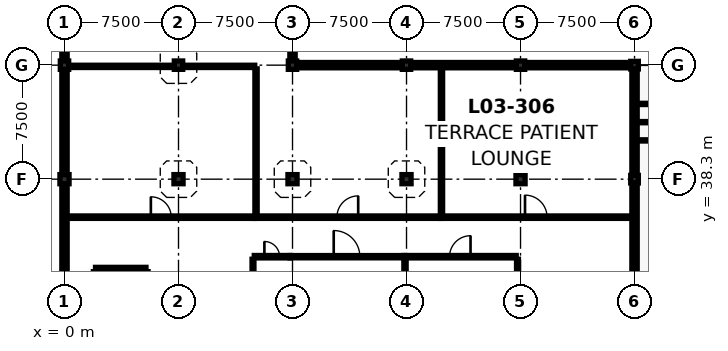
"""IFC4 building model, lengths in metres.
Left out: names, types, materials, properties, quantities, classifications, styles, units other than length and angle.
Written with IfcOpenShell. Run it as: python <this file> out.ifc"""

import sys

from ifc_helpers import new_model, si_unit, direction, frame, frame_2d, origin, origin_2d, place, context, subcontext, project, spatial, rectangle, extrude, element, fill, save


model = new_model("IFC4")
c1 = context("Model", 3, precision=1e-05, world=origin(), true_north=direction((0.0, 1.0)))
c2 = subcontext(c1, "Body", "Model", "MODEL_VIEW")
j1 = project(units=[si_unit("LENGTHUNIT", "METRE"), si_unit("PLANEANGLEUNIT", "RADIAN")], contexts=[c1])
p1 = place(None, origin())
s1 = spatial("IfcSite", under=j1, at=p1, CompositionType="ELEMENT")
p2 = place(p1, origin())
s2 = spatial("IfcBuilding", under=s1, at=p2, CompositionType="ELEMENT")
p3 = place(p2, frame((0.0, 0.0, 13.5)))
s3 = spatial("IfcBuildingStorey", under=s2, at=p3, CompositionType="ELEMENT", Elevation=13.5)
p4 = place(p3, frame((0.0, 38.3, 0.0), z_axis=(0.0, 0.0, 1.0), x_axis=(1.0, 0.0, 0.0)))
e1 = element("IfcColumn", 1, at=p4, inside=s3, PredefinedType="COLUMN", context=c2, shape_type="SweptSolid", body=[
    extrude(rectangle(XDim=0.6, YDim=0.6, at=origin_2d()), origin(), (0.0, 0.0, 1.0), 3.72),
])
p5 = place(p3, frame((0.0, 45.8, 0.0), z_axis=(0.0, 0.0, 1.0), x_axis=(1.0, 0.0, 0.0)))
e2 = element("IfcColumn", 2, at=p5, inside=s3, PredefinedType="COLUMN", context=c2, shape_type="SweptSolid", body=[
    extrude(rectangle(XDim=0.55, YDim=0.55, at=origin_2d()), origin(), (0.0, 0.0, 1.0), 3.72),
])
p6 = place(p3, frame((7.5, 38.3, 0.0), z_axis=(0.0, 0.0, 1.0), x_axis=(1.0, 0.0, 0.0)))
e3 = element("IfcColumn", 3, at=p6, inside=s3, PredefinedType="COLUMN", context=c2, shape_type="SweptSolid", body=[
    extrude(rectangle(XDim=0.6, YDim=0.6, at=origin_2d()), origin(), (0.0, 0.0, 1.0), 3.72),
])
p7 = place(p3, frame((7.5, 45.8, 0.0), z_axis=(0.0, 0.0, 1.0), x_axis=(1.0, 0.0, 0.0)))
e4 = element("IfcColumn", 4, at=p7, inside=s3, PredefinedType="COLUMN", context=c2, shape_type="SweptSolid", body=[
    extrude(rectangle(XDim=0.55, YDim=0.55, at=origin_2d()), origin(), (0.0, 0.0, 1.0), 3.72),
])
p8 = place(p3, frame((15.0, 38.3, 0.0), z_axis=(0.0, 0.0, 1.0), x_axis=(1.0, 0.0, 0.0)))
e5 = element("IfcColumn", 5, at=p8, inside=s3, PredefinedType="COLUMN", context=c2, shape_type="SweptSolid", body=[
    extrude(rectangle(XDim=0.6, YDim=0.6, at=origin_2d()), origin(), (0.0, 0.0, 1.0), 3.72),
])
p9 = place(p3, frame((15.0, 45.8, 0.0), z_axis=(0.0, 0.0, 1.0), x_axis=(1.0, 0.0, 0.0)))
e6 = element("IfcColumn", 6, at=p9, inside=s3, PredefinedType="COLUMN", context=c2, shape_type="SweptSolid", body=[
    extrude(rectangle(XDim=0.55, YDim=0.55, at=origin_2d()), origin(), (0.0, 0.0, 1.0), 3.72),
])
p10 = place(p3, frame((22.5, 38.3, 0.0), z_axis=(0.0, 0.0, 1.0), x_axis=(1.0, 0.0, 0.0)))
e7 = element("IfcColumn", 7, at=p10, inside=s3, PredefinedType="COLUMN", context=c2, shape_type="SweptSolid", body=[
    extrude(rectangle(XDim=0.6, YDim=0.6, at=origin_2d()), origin(), (0.0, 0.0, 1.0), 3.72),
])
p11 = place(p3, frame((22.5, 45.8, 0.0), z_axis=(0.0, 0.0, 1.0), x_axis=(1.0, 0.0, 0.0)))
e8 = element("IfcColumn", 8, at=p11, inside=s3, PredefinedType="COLUMN", context=c2, shape_type="SweptSolid", body=[
    extrude(rectangle(XDim=0.55, YDim=0.55, at=origin_2d()), origin(), (0.0, 0.0, 1.0), 3.72),
])
p12 = place(p3, frame((30.0, 38.3, 0.0), z_axis=(0.0, 0.0, 1.0), x_axis=(1.0, 0.0, 0.0)))
e9 = element("IfcColumn", 9, at=p12, inside=s3, PredefinedType="COLUMN", context=c2, shape_type="SweptSolid", body=[
    extrude(rectangle(XDim=0.6, YDim=0.6, at=origin_2d()), origin(), (0.0, 0.0, 1.0), 3.72),
])
p13 = place(p3, frame((30.0, 45.8, 0.0), z_axis=(0.0, 0.0, 1.0), x_axis=(1.0, 0.0, 0.0)))
e10 = element("IfcColumn", 10, at=p13, inside=s3, PredefinedType="COLUMN", context=c2, shape_type="SweptSolid", body=[
    extrude(rectangle(XDim=0.55, YDim=0.55, at=origin_2d()), origin(), (0.0, 0.0, 1.0), 3.72),
])
for number, where, z_axis, x_axis in (
    (11, (37.5, 38.3, 0.0), (0.0, 0.0, 1.0), (1.0, 0.0, 0.0)),
    (12, (37.5, 45.8, 0.0), (0.0, 0.0, 1.0), (1.0, 0.0, 0.0)),
):
    element("IfcColumn", number, at=place(p3, frame(where, z_axis=z_axis, x_axis=x_axis)), inside=s3, PredefinedType="COLUMN", context=c2, shape_type="SweptSolid", body=[
        extrude(rectangle(XDim=0.5, YDim=0.5, at=origin_2d()), origin(), (0.0, 0.0, 1.0), 3.72),
    ])
for number, where, z_axis, x_axis in (
    (13, (15.275, 45.8, 0.0), (0.0, 0.0, 1.0), (1.0, 0.0, 0.0)),
    (14, (22.775, 45.8, 0.0), (0.0, 0.0, 1.0), (1.0, 0.0, 0.0)),
):
    element("IfcWall", number, at=place(p3, frame(where, z_axis=z_axis, x_axis=x_axis)), inside=s3, PredefinedType="SOLIDWALL", context=c2, shape_type="SweptSolid", body=[
        extrude(rectangle(XDim=6.95, YDim=0.35, at=frame_2d((3.475, 0.0))), origin(), (0.0, 0.0, 1.0), 2.805),
    ])
p14 = place(p3, frame((30.275, 45.8, 0.0), z_axis=(0.0, 0.0, 1.0), x_axis=(1.0, 0.0, 0.0)))
e15 = element("IfcWall", 15, at=p14, inside=s3, PredefinedType="SOLIDWALL", context=c2, shape_type="SweptSolid", body=[
    extrude(rectangle(XDim=6.975, YDim=0.35, at=frame_2d((3.488, 0.0))), origin(), (0.0, 0.0, 1.0), 3.055),
])
p15 = place(p3, frame((37.5, 45.55, 0.0), z_axis=(0.0, 0.0, 1.0), x_axis=(0.0, -1.0, 0.0)))
e16 = element("IfcWall", 16, at=p15, inside=s3, PredefinedType="SOLIDWALL", context=c2, shape_type="SweptSolid", body=[
    extrude(rectangle(XDim=7.0, YDim=0.35, at=frame_2d((3.5, 0.0))), origin(), (0.0, 0.0, 1.0), 3.7),
])
p16 = place(p15, frame((2.8, 0.0, 0.9)))
e17 = element("IfcOpeningElement", 17, at=p16, cuts=e16, PredefinedType="OPENING", context=c2, shape_type="SweptSolid", body=[
    extrude(rectangle(XDim=1.4, YDim=1.9, at=frame_2d((0.7, 0.95))), frame((0.0, 0.187, 0.0), z_axis=(0.0, -1.0, 0.0), x_axis=(1.0, 0.0, 0.0)), (0.0, 0.0, 1.0), 0.374),
])
p17 = place(p3, frame((37.5, 38.05, 0.0), z_axis=(0.0, 0.0, 1.0), x_axis=(0.0, -1.0, 0.0)))
e18 = element("IfcWall", 18, at=p17, inside=s3, PredefinedType="SOLIDWALL", context=c2, shape_type="SweptSolid", body=[
    extrude(rectangle(XDim=7.0, YDim=0.35, at=frame_2d((3.5, 0.0))), origin(), (0.0, 0.0, 1.0), 3.7),
])
p18 = place(p3, frame((0.0, 31.1, 0.0), z_axis=(0.0, 0.0, 1.0), x_axis=(0.0, 1.0, 0.0)))
e19 = element("IfcWall", 19, at=p18, inside=s3, PredefinedType="SOLIDWALL", context=c2, shape_type="SweptSolid", body=[
    extrude(rectangle(XDim=6.9, YDim=0.35, at=frame_2d((3.45, 0.0))), origin(), (0.0, 0.0, 1.0), 2.805),
])
p19 = place(p3, frame((0.0, 38.6, 0.0), z_axis=(0.0, 0.0, 1.0), x_axis=(0.0, 1.0, 0.0)))
e20 = element("IfcWall", 20, at=p19, inside=s3, PredefinedType="SOLIDWALL", context=c2, shape_type="SweptSolid", body=[
    extrude(rectangle(XDim=6.925, YDim=0.35, at=frame_2d((3.462, 0.0))), origin(), (0.0, 0.0, 1.0), 2.805),
])
p20 = place(p3, frame((0.0, 46.075, 0.0), z_axis=(0.0, 0.0, 1.0), x_axis=(0.0, 1.0, 0.0)))
e21 = element("IfcWall", 21, at=p20, inside=s3, PredefinedType="SOLIDWALL", context=c2, shape_type="SweptSolid", body=[
    extrude(rectangle(XDim=6.975, YDim=0.35, at=frame_2d((3.488, 0.0))), origin(), (0.0, 0.0, 1.0), 3.055),
])
p21 = place(p3, frame((15.0, 53.05, 0.0), z_axis=(0.0, 0.0, 1.0), x_axis=(0.0, -1.0, 0.0)))
e22 = element("IfcWall", 22, at=p21, inside=s3, PredefinedType="SOLIDWALL", context=c2, shape_type="SweptSolid", body=[
    extrude(rectangle(XDim=6.975, YDim=0.35, at=frame_2d((3.488, 0.0))), origin(), (0.0, 0.0, 1.0), 3.055),
])
p22 = place(p21, frame((2.587, 0.0, 0.9)))
e23 = element("IfcOpeningElement", 23, at=p22, cuts=e22, PredefinedType="OPENING", context=c2, shape_type="SweptSolid", body=[
    extrude(rectangle(XDim=1.8, YDim=1.5, at=frame_2d((0.9, 0.75))), frame((0.0, 0.187, 0.0), z_axis=(0.0, -1.0, 0.0), x_axis=(1.0, 0.0, 0.0)), (0.0, 0.0, 1.0), 0.374),
])
p23 = place(p3, frame((5.36, 24.985, 0.0), z_axis=(0.0, 0.0, 1.0), x_axis=(0.0, 1.0, 0.0)))
e24 = element("IfcWall", 24, at=p23, inside=s3, PredefinedType="SHEAR", context=c2, shape_type="SweptSolid", body=[
    extrude(rectangle(XDim=7.23, YDim=0.28, at=frame_2d((3.615, 0.0))), origin(), (0.0, 0.0, 1.0), 3.72),
])
p24 = place(p3, frame((5.36, 32.36, 0.0), z_axis=(0.0, 0.0, 1.0), x_axis=(-1.0, 0.0, 0.0)))
e25 = element("IfcWall", 25, at=p24, inside=s3, PredefinedType="SHEAR", context=c2, shape_type="SweptSolid", body=[
    extrude(rectangle(XDim=3.32, YDim=0.28, at=frame_2d((1.66, 0.0))), origin(), (0.0, 0.0, 1.0), 3.72),
])
p25 = place(p3, frame((2.04, 32.215, 0.0), z_axis=(0.0, 0.0, 1.0), x_axis=(0.0, -1.0, 0.0)))
e26 = element("IfcWall", 26, at=p25, inside=s3, PredefinedType="SHEAR", context=c2, shape_type="SweptSolid", body=[
    extrude(rectangle(XDim=7.23, YDim=0.28, at=frame_2d((3.615, 0.0))), origin(), (0.0, 0.0, 1.0), 3.72),
])
p26 = place(p3, frame((0.187, 35.8, 0.0), z_axis=(0.0, 0.0, 1.0), x_axis=(1.0, 0.0, 0.0)))
e27 = element("IfcWall", 27, at=p26, inside=s3, PredefinedType="PARTITIONING", context=c2, shape_type="SweptSolid", body=[
    extrude(rectangle(XDim=12.328, YDim=0.16, at=frame_2d((6.164, 0.0))), origin(), (0.0, 0.0, 1.0), 2.805),
])
p27 = place(p26, frame((5.494, 0.0, 0.0)))
e28 = element("IfcOpeningElement", 28, at=p27, cuts=e27, PredefinedType="OPENING", context=c2, shape_type="SweptSolid", body=[
    extrude(rectangle(XDim=1.34, YDim=2.24, at=frame_2d((0.67, 1.12))), frame((0.0, 0.092, 0.0), z_axis=(0.0, -1.0, 0.0), x_axis=(1.0, 0.0, 0.0)), (0.0, 0.0, 1.0), 0.184),
])
p28 = place(p3, frame((12.527, 35.8, 0.0), z_axis=(0.0, 0.0, 1.0), x_axis=(1.0, 0.0, 0.0)))
e29 = element("IfcWall", 29, at=p28, inside=s3, PredefinedType="PARTITIONING", context=c2, shape_type="SweptSolid", body=[
    extrude(rectangle(XDim=12.188, YDim=0.16, at=frame_2d((6.094, 0.0))), origin(), (0.0, 0.0, 1.0), 2.805),
])
p29 = place(p28, frame((5.394, 0.0, 0.0)))
e30 = element("IfcOpeningElement", 30, at=p29, cuts=e29, PredefinedType="OPENING", context=c2, shape_type="SweptSolid", body=[
    extrude(rectangle(XDim=1.4, YDim=2.25, at=frame_2d((0.7, 1.125))), frame((0.0, 0.092, 0.0), z_axis=(0.0, -1.0, 0.0), x_axis=(1.0, 0.0, 0.0)), (0.0, 0.0, 1.0), 0.184),
])
p30 = place(p3, frame((24.727, 35.8, 0.0), z_axis=(0.0, 0.0, 1.0), x_axis=(1.0, 0.0, 0.0)))
e31 = element("IfcWall", 31, at=p30, inside=s3, PredefinedType="PARTITIONING", context=c2, shape_type="SweptSolid", body=[
    extrude(rectangle(XDim=12.586, YDim=0.16, at=frame_2d((6.293, 0.0))), origin(), (0.0, 0.0, 1.0), 3.055),
])
p31 = place(p30, frame((5.568, 0.0, 0.0)))
e32 = element("IfcOpeningElement", 32, at=p31, cuts=e31, PredefinedType="OPENING", context=c2, shape_type="SweptSolid", body=[
    extrude(rectangle(XDim=1.45, YDim=2.26, at=frame_2d((0.725, 1.13))), frame((0.0, 0.092, 0.0), z_axis=(0.0, -1.0, 0.0), x_axis=(1.0, 0.0, 0.0)), (0.0, 0.0, 1.0), 0.184),
])
p32 = place(p3, frame((12.485, 33.2, 0.0), z_axis=(0.0, 0.0, 1.0), x_axis=(1.0, 0.0, 0.0)))
e33 = element("IfcWall", 33, at=p32, inside=s3, PredefinedType="PARTITIONING", context=c2, shape_type="SweptSolid", body=[
    extrude(rectangle(XDim=2.33, YDim=0.16, at=frame_2d((1.165, 0.0))), origin(), (0.0, 0.0, 1.0), 2.805),
])
p33 = place(p32, frame((0.665, 0.0, 0.0)))
e34 = element("IfcOpeningElement", 34, at=p33, cuts=e33, PredefinedType="OPENING", context=c2, shape_type="SweptSolid", body=[
    extrude(rectangle(XDim=1.0, YDim=2.15, at=frame_2d((0.5, 1.075))), frame((0.0, 0.092, 0.0), z_axis=(0.0, -1.0, 0.0), x_axis=(1.0, 0.0, 0.0)), (0.0, 0.0, 1.0), 0.184),
])
p34 = place(p3, frame((14.827, 33.2, 0.0), z_axis=(0.0, 0.0, 1.0), x_axis=(1.0, 0.0, 0.0)))
e35 = element("IfcWall", 35, at=p34, inside=s3, PredefinedType="PARTITIONING", context=c2, shape_type="SweptSolid", body=[
    extrude(rectangle(XDim=7.488, YDim=0.15, at=frame_2d((3.744, 0.0))), origin(), (0.0, 0.0, 1.0), 2.805),
])
p35 = place(p34, frame((2.884, 0.0, 0.0)))
e36 = element("IfcOpeningElement", 36, at=p35, cuts=e35, PredefinedType="OPENING", context=c2, shape_type="SweptSolid", body=[
    extrude(rectangle(XDim=1.72, YDim=2.34, at=frame_2d((0.86, 1.17))), frame((0.0, 0.087, 0.0), z_axis=(0.0, -1.0, 0.0), x_axis=(1.0, 0.0, 0.0)), (0.0, 0.0, 1.0), 0.174),
])
p36 = place(p3, frame((22.327, 33.2, 0.0), z_axis=(0.0, 0.0, 1.0), x_axis=(1.0, 0.0, 0.0)))
e37 = element("IfcWall", 37, at=p36, inside=s3, PredefinedType="PARTITIONING", context=c2, shape_type="SweptSolid", body=[
    extrude(rectangle(XDim=7.388, YDim=0.16, at=frame_2d((3.694, 0.0))), origin(), (0.0, 0.0, 1.0), 2.805),
])
p37 = place(p36, frame((3.004, 0.0, 0.0)))
e38 = element("IfcOpeningElement", 38, at=p37, cuts=e37, PredefinedType="OPENING", context=c2, shape_type="SweptSolid", body=[
    extrude(rectangle(XDim=1.38, YDim=2.3, at=frame_2d((0.69, 1.15))), frame((0.0, 0.092, 0.0), z_axis=(0.0, -1.0, 0.0), x_axis=(1.0, 0.0, 0.0)), (0.0, 0.0, 1.0), 0.184),
])
p38 = place(p3, frame((0.287, 45.72, 0.0), z_axis=(0.0, 0.0, 1.0), x_axis=(1.0, 0.0, 0.0)))
e39 = element("IfcWall", 39, at=p38, inside=s3, PredefinedType="PARTITIONING", context=c2, shape_type="SweptSolid", body=[
    extrude(rectangle(XDim=12.228, YDim=0.15, at=frame_2d((6.114, 0.0))), origin(), (0.0, 0.0, 1.0), 2.805),
])
p39 = place(p3, frame((12.6, 35.892, 0.0), z_axis=(0.0, 0.0, 1.0), x_axis=(0.0, 1.0, 0.0)))
e40 = element("IfcWall", 40, at=p39, inside=s3, PredefinedType="PARTITIONING", context=c2, shape_type="SweptSolid", body=[
    extrude(rectangle(XDim=9.663, YDim=0.15, at=frame_2d((4.832, 0.0))), origin(), (0.0, 0.0, 1.0), 2.805),
])
p40 = place(p3, frame((24.8, 35.892, 0.0), z_axis=(0.0, 0.0, 1.0), x_axis=(0.0, 1.0, 0.0)))
e41 = element("IfcWall", 41, at=p40, inside=s3, PredefinedType="PARTITIONING", context=c2, shape_type="SweptSolid", body=[
    extrude(rectangle(XDim=9.721, YDim=0.15, at=frame_2d((4.86, 0.0))), origin(), (0.0, 0.0, 1.0), 2.805),
])
p41 = place(p3, frame((12.4, 15.965, 0.0), z_axis=(0.0, 0.0, 1.0), x_axis=(0.0, 1.0, 0.0)))
e42 = element("IfcWall", 42, at=p41, inside=s3, PredefinedType="PARTITIONING", context=c2, shape_type="SweptSolid", body=[
    extrude(rectangle(XDim=17.07, YDim=0.125, at=frame_2d((8.535, 0.0))), origin(), (0.0, 0.0, 1.0), 2.805),
])
p42 = place(p3, frame((22.4, 31.112, 0.0), z_axis=(0.0, 0.0, 1.0), x_axis=(0.0, 1.0, 0.0)))
e43 = element("IfcWall", 43, at=p42, inside=s3, PredefinedType="PARTITIONING", context=c2, shape_type="SweptSolid", body=[
    extrude(rectangle(XDim=1.996, YDim=0.15, at=frame_2d((0.998, 0.0))), origin(), (0.0, 0.0, 1.0), 2.805),
])
p43 = place(p3, frame((29.8, 31.112, 0.0), z_axis=(0.0, 0.0, 1.0), x_axis=(0.0, 1.0, 0.0)))
e44 = element("IfcWall", 44, at=p43, inside=s3, PredefinedType="PARTITIONING", context=c2, shape_type="SweptSolid", body=[
    extrude(rectangle(XDim=1.923, YDim=0.125, at=frame_2d((0.961, 0.0))), origin(), (0.0, 0.0, 1.0), 3.055),
])
p44 = place(p16, origin())
e45 = element("IfcWindow", 45, at=p44, inside=s3, PartitioningType="SINGLE_PANEL", PredefinedType="WINDOW", context=c2, shape_type="SweptSolid", body=[
    extrude(rectangle(XDim=1.4, YDim=1.9, at=frame_2d((0.7, 0.95))), frame((0.0, 0.03, 0.0), z_axis=(0.0, -1.0, 0.0), x_axis=(1.0, 0.0, 0.0)), (0.0, 0.0, 1.0), 0.06),
])
fill(e17, e45)
p45 = place(p27, origin())
e46 = element("IfcDoor", 46, at=p45, inside=s3, OperationType="SINGLE_SWING_LEFT", PredefinedType="DOOR", context=c2, shape_type="SweptSolid", body=[
    extrude(rectangle(XDim=1.34, YDim=2.24, at=frame_2d((0.67, 1.12))), frame((0.0, 0.025, 0.0), z_axis=(0.0, -1.0, 0.0), x_axis=(1.0, 0.0, 0.0)), (0.0, 0.0, 1.0), 0.05),
])
fill(e28, e46)
p46 = place(p29, origin())
e47 = element("IfcDoor", 47, at=p46, inside=s3, OperationType="SINGLE_SWING_RIGHT", PredefinedType="DOOR", context=c2, shape_type="SweptSolid", body=[
    extrude(rectangle(XDim=1.4, YDim=2.25, at=frame_2d((0.7, 1.125))), frame((0.0, 0.025, 0.0), z_axis=(0.0, -1.0, 0.0), x_axis=(1.0, 0.0, 0.0)), (0.0, 0.0, 1.0), 0.05),
])
fill(e30, e47)
p47 = place(p31, origin())
e48 = element("IfcDoor", 48, at=p47, inside=s3, OperationType="SINGLE_SWING_LEFT", PredefinedType="DOOR", context=c2, shape_type="SweptSolid", body=[
    extrude(rectangle(XDim=1.45, YDim=2.26, at=frame_2d((0.725, 1.13))), frame((0.0, 0.025, 0.0), z_axis=(0.0, -1.0, 0.0), x_axis=(1.0, 0.0, 0.0)), (0.0, 0.0, 1.0), 0.05),
])
fill(e32, e48)
p48 = place(p33, origin())
e49 = element("IfcDoor", 49, at=p48, inside=s3, OperationType="SINGLE_SWING_LEFT", PredefinedType="DOOR", context=c2, shape_type="SweptSolid", body=[
    extrude(rectangle(XDim=1.0, YDim=2.15, at=frame_2d((0.5, 1.075))), frame((0.0, 0.025, 0.0), z_axis=(0.0, -1.0, 0.0), x_axis=(1.0, 0.0, 0.0)), (0.0, 0.0, 1.0), 0.05),
])
fill(e34, e49)
p49 = place(p35, origin())
e50 = element("IfcDoor", 50, at=p49, inside=s3, OperationType="SINGLE_SWING_LEFT", PredefinedType="DOOR", context=c2, shape_type="SweptSolid", body=[
    extrude(rectangle(XDim=1.72, YDim=2.34, at=frame_2d((0.86, 1.17))), frame((0.0, 0.025, 0.0), z_axis=(0.0, -1.0, 0.0), x_axis=(1.0, 0.0, 0.0)), (0.0, 0.0, 1.0), 0.05),
])
fill(e36, e50)
p50 = place(p37, origin())
e51 = element("IfcDoor", 51, at=p50, inside=s3, OperationType="SINGLE_SWING_RIGHT", PredefinedType="DOOR", context=c2, shape_type="SweptSolid", body=[
    extrude(rectangle(XDim=1.38, YDim=2.3, at=frame_2d((0.69, 1.15))), frame((0.0, 0.025, 0.0), z_axis=(0.0, -1.0, 0.0), x_axis=(1.0, 0.0, 0.0)), (0.0, 0.0, 1.0), 0.05),
])
fill(e38, e51)
save(model, sys.argv[1])
